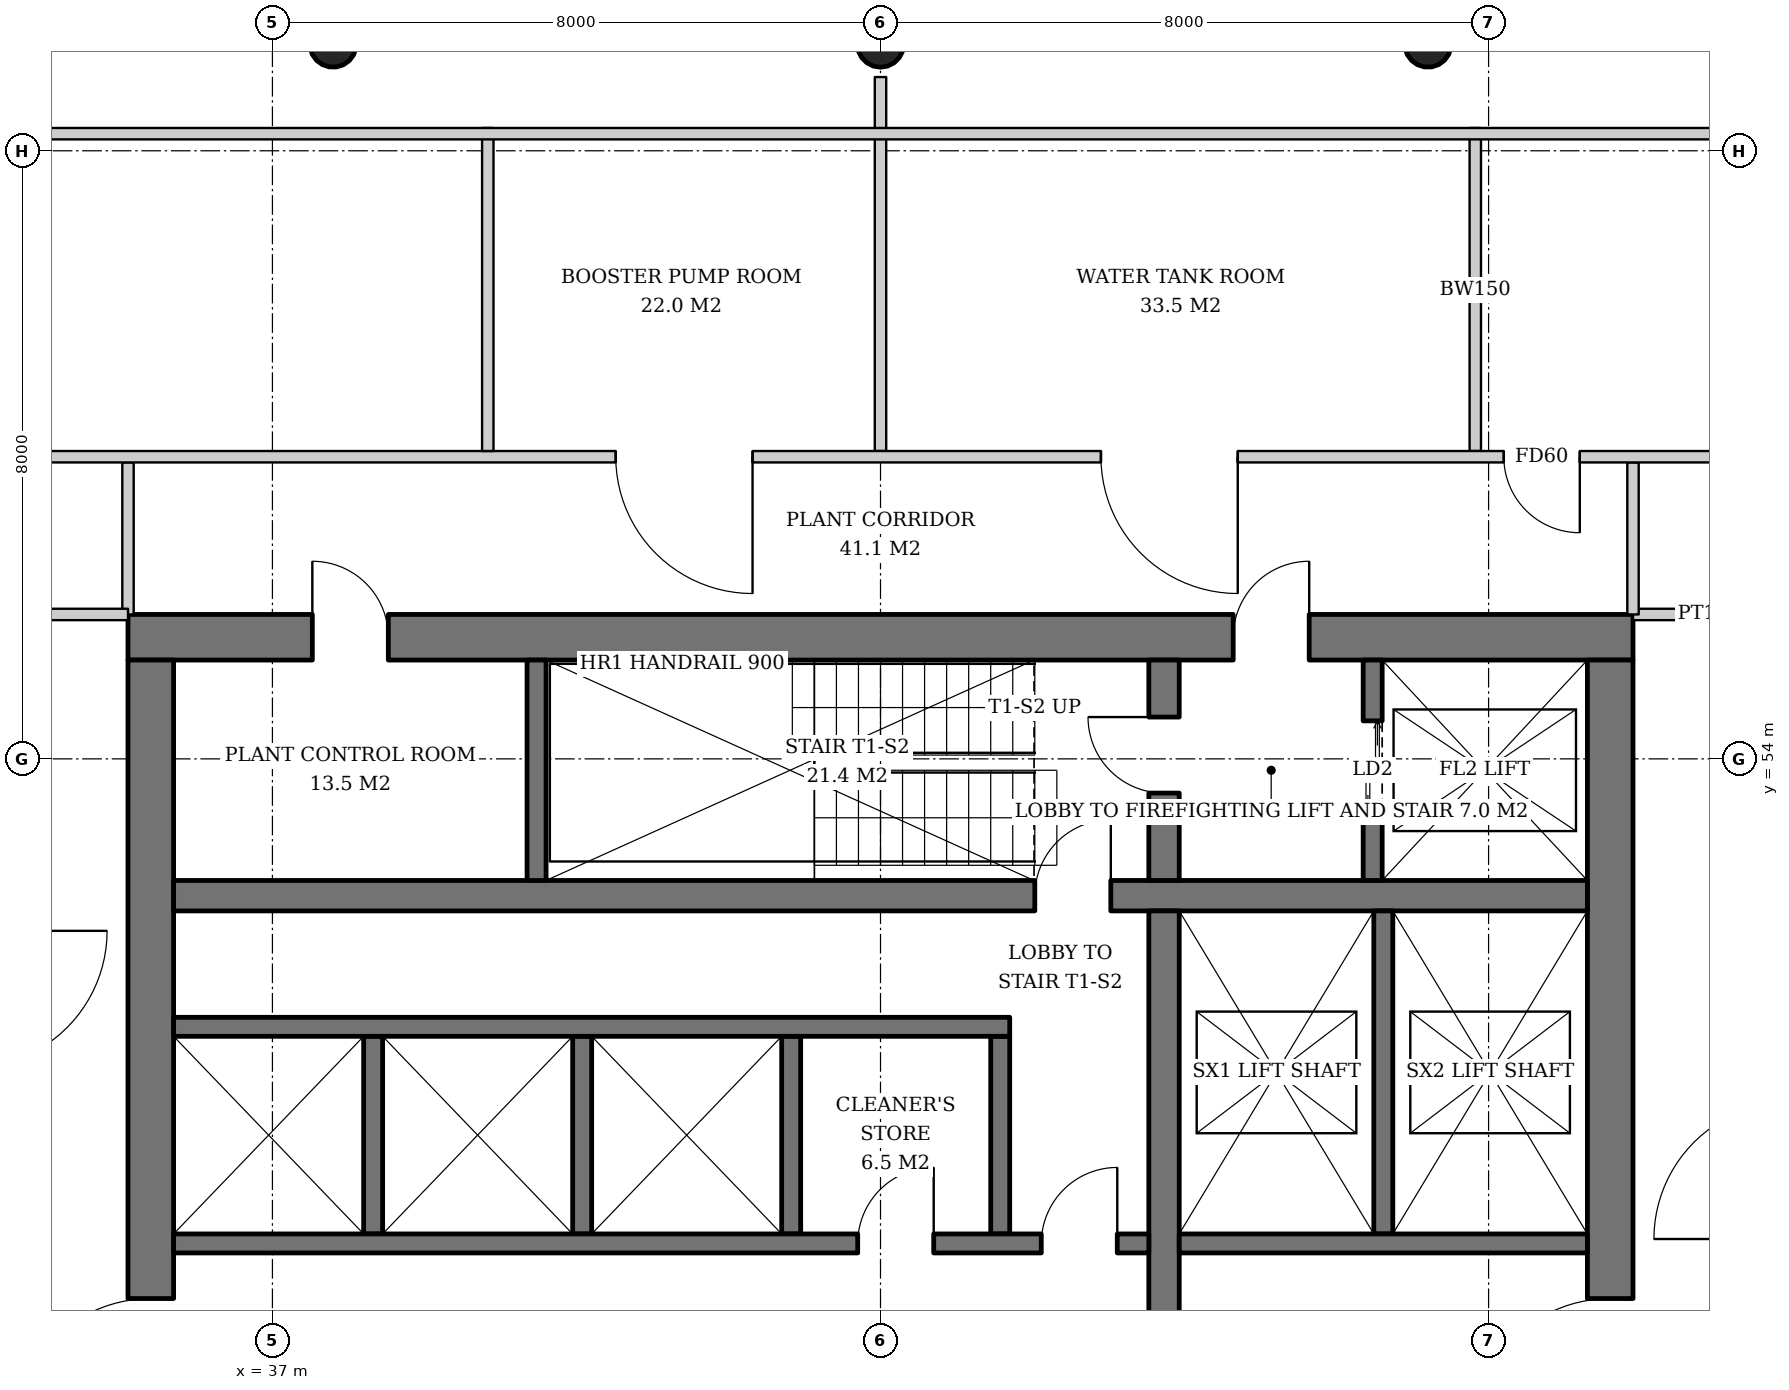
"""IFC4 building model, lengths in metres.
Left out: names, types, materials, properties, quantities, classifications, styles, units other than length and angle.
Written with IfcOpenShell. Run it as: python <this file> out.ifc"""

import sys

from ifc_helpers import new_model, si_unit, direction, frame, frame_2d, origin, origin_2d, place, context, subcontext, project, spatial, rectangle, hollow_circle, extrude, element, fill, save


model = new_model("IFC4")
c1 = context("Model", 3, precision=1e-05, world=origin(), true_north=direction((0.0, 1.0)))
c2 = subcontext(c1, "Body", "Model", "MODEL_VIEW")
j1 = project(units=[si_unit("LENGTHUNIT", "METRE"), si_unit("PLANEANGLEUNIT", "RADIAN")], contexts=[c1])
p1 = place(None, origin())
s1 = spatial("IfcSite", under=j1, at=p1, CompositionType="ELEMENT")
p2 = place(p1, origin())
s2 = spatial("IfcBuilding", under=s1, at=p2, CompositionType="ELEMENT")
p3 = place(p2, frame((0.0, 0.0, 226.2)))
s3 = spatial("IfcBuildingStorey", under=s2, at=p3, CompositionType="ELEMENT", Elevation=226.2)
p4 = place(p3, frame((52.221, 63.443, 0.0), z_axis=(-0.015987237665, -0.031910269556, 0.999362868496), x_axis=(0.894067115991, -0.447933021895, 0.0)))
e1 = element("IfcColumn", 1, at=p4, inside=s3, PredefinedType="COLUMN", context=c2, shape_type="SweptSolid", body=[
    extrude(hollow_circle(Radius=0.305, WallThickness=0.025, at=origin_2d()), origin(), (0.0, 0.0, 1.0), 3.802),
])
p5 = place(p3, frame((45.0, 63.443, 0.0), z_axis=(0.0, -0.031914348339, 0.999490607445), x_axis=(1.0, 0.0, 0.0)))
e2 = element("IfcColumn", 2, at=p5, inside=s3, PredefinedType="COLUMN", context=c2, shape_type="SweptSolid", body=[
    extrude(hollow_circle(Radius=0.305, WallThickness=0.025, at=origin_2d()), origin(), (0.0, 0.0, 1.0), 3.802),
])
p6 = place(p3, frame((37.779, 63.443, 0.0), z_axis=(0.015987237665, -0.031910269556, 0.999362868496), x_axis=(0.894067115991, 0.447933021895, 0.0)))
e3 = element("IfcColumn", 3, at=p6, inside=s3, PredefinedType="COLUMN", context=c2, shape_type="SweptSolid", body=[
    extrude(hollow_circle(Radius=0.305, WallThickness=0.025, at=origin_2d()), origin(), (0.0, 0.0, 1.0), 3.802),
])
p7 = place(p3, frame((35.1, 55.6, 0.0), z_axis=(0.0, 0.0, 1.0), x_axis=(1.0, 0.0, 0.0)))
e4 = element("IfcWall", 4, at=p7, inside=s3, PredefinedType="SHEAR", context=c2, shape_type="SweptSolid", body=[
    extrude(rectangle(XDim=19.8, YDim=0.6, at=frame_2d((9.9, 0.0))), origin(), (0.0, 0.0, 1.0), 3.8),
])
p8 = place(p7, frame((14.54, 0.0, 0.0)))
e5 = element("IfcOpeningElement", 5, at=p8, cuts=e4, PredefinedType="OPENING", context=c2, shape_type="SweptSolid", body=[
    extrude(rectangle(XDim=1.0, YDim=2.1, at=frame_2d((0.5, 1.05))), frame((0.0, 0.31, 0.0), z_axis=(0.0, -1.0, 0.0), x_axis=(1.0, 0.0, 0.0)), (0.0, 0.0, 1.0), 0.62),
])
p9 = place(p7, frame((2.425, 0.0, 0.0)))
e6 = element("IfcOpeningElement", 6, at=p9, cuts=e4, PredefinedType="OPENING", context=c2, shape_type="SweptSolid", body=[
    extrude(rectangle(XDim=1.0, YDim=2.1, at=frame_2d((0.5, 1.05))), frame((0.0, 0.31, 0.0), z_axis=(0.0, -1.0, 0.0), x_axis=(1.0, 0.0, 0.0)), (0.0, 0.0, 1.0), 0.62),
])
p10 = place(p3, frame((35.4, 36.7, 0.0), z_axis=(0.0, 0.0, 1.0), x_axis=(0.0, 1.0, 0.0)))
e7 = element("IfcWall", 7, at=p10, inside=s3, PredefinedType="SHEAR", context=c2, shape_type="SweptSolid", body=[
    extrude(rectangle(XDim=18.6, YDim=0.6, at=frame_2d((9.3, 0.0))), origin(), (0.0, 0.0, 1.0), 3.8),
])
p11 = place(p10, frame((8.4, 0.0, 0.0)))
e8 = element("IfcOpeningElement", 8, at=p11, cuts=e7, PredefinedType="OPENING", context=c2, shape_type="SweptSolid", body=[
    extrude(rectangle(XDim=1.8, YDim=2.4, at=frame_2d((0.9, 1.2))), frame((0.0, 0.31, 0.0), z_axis=(0.0, -1.0, 0.0), x_axis=(1.0, 0.0, 0.0)), (0.0, 0.0, 1.0), 0.62),
])
p12 = place(p3, frame((54.6, 36.7, 0.0), z_axis=(0.0, 0.0, 1.0), x_axis=(0.0, 1.0, 0.0)))
e9 = element("IfcWall", 9, at=p12, inside=s3, PredefinedType="SHEAR", context=c2, shape_type="SweptSolid", body=[
    extrude(rectangle(XDim=18.6, YDim=0.6, at=frame_2d((9.3, 0.0))), origin(), (0.0, 0.0, 1.0), 3.8),
])
p13 = place(p12, frame((8.4, 0.0, 0.0)))
e10 = element("IfcOpeningElement", 10, at=p13, cuts=e9, PredefinedType="OPENING", context=c2, shape_type="SweptSolid", body=[
    extrude(rectangle(XDim=1.8, YDim=2.4, at=frame_2d((0.9, 1.2))), frame((0.0, 0.31, 0.0), z_axis=(0.0, -1.0, 0.0), x_axis=(1.0, 0.0, 0.0)), (0.0, 0.0, 1.0), 0.62),
])
p14 = place(p3, frame((35.7, 52.2, 0.0), z_axis=(0.0, 0.0, 1.0), x_axis=(1.0, 0.0, 0.0)))
e11 = element("IfcWall", 11, at=p14, inside=s3, PredefinedType="SHEAR", context=c2, shape_type="SweptSolid", body=[
    extrude(rectangle(XDim=18.6, YDim=0.4, at=frame_2d((9.3, 0.0))), origin(), (0.0, 0.0, 1.0), 3.8),
])
p15 = place(p14, frame((11.33, 0.0, 0.0)))
e12 = element("IfcOpeningElement", 12, at=p15, cuts=e11, PredefinedType="OPENING", context=c2, shape_type="SweptSolid", body=[
    extrude(rectangle(XDim=1.0, YDim=2.1, at=frame_2d((0.5, 1.05))), frame((0.0, 0.21, 0.0), z_axis=(0.0, -1.0, 0.0), x_axis=(1.0, 0.0, 0.0)), (0.0, 0.0, 1.0), 0.42),
])
p16 = place(p3, frame((48.73, 40.0, 0.0), z_axis=(0.0, 0.0, 1.0), x_axis=(0.0, 1.0, 0.0)))
e13 = element("IfcWall", 13, at=p16, inside=s3, PredefinedType="SHEAR", context=c2, shape_type="SweptSolid", body=[
    extrude(rectangle(XDim=12.0, YDim=0.4, at=frame_2d((6.0, 0.0))), origin(), (0.0, 0.0, 1.0), 3.8),
])
p17 = place(p16, frame((5.5, 0.0, 0.0)))
e14 = element("IfcOpeningElement", 14, at=p17, cuts=e13, PredefinedType="OPENING", context=c2, shape_type="SweptSolid", body=[
    extrude(rectangle(XDim=1.0, YDim=2.1, at=frame_2d((0.5, 1.05))), frame((0.0, 0.21, 0.0), z_axis=(0.0, -1.0, 0.0), x_axis=(1.0, 0.0, 0.0)), (0.0, 0.0, 1.0), 0.42),
])
p18 = place(p3, frame((48.73, 52.4, 0.0), z_axis=(0.0, 0.0, 1.0), x_axis=(0.0, 1.0, 0.0)))
e15 = element("IfcWall", 15, at=p18, inside=s3, PredefinedType="SHEAR", context=c2, shape_type="SweptSolid", body=[
    extrude(rectangle(XDim=2.9, YDim=0.4, at=frame_2d((1.45, 0.0))), origin(), (0.0, 0.0, 1.0), 3.8),
])
p19 = place(p18, frame((1.15, 0.0, 0.0)))
e16 = element("IfcOpeningElement", 16, at=p19, cuts=e15, PredefinedType="OPENING", context=c2, shape_type="SweptSolid", body=[
    extrude(rectangle(XDim=1.0, YDim=2.1, at=frame_2d((0.5, 1.05))), frame((0.0, 0.21, 0.0), z_axis=(0.0, -1.0, 0.0), x_axis=(1.0, 0.0, 0.0)), (0.0, 0.0, 1.0), 0.42),
])
p20 = place(p3, frame((40.475, 52.4, 0.0), z_axis=(0.0, 0.0, 1.0), x_axis=(0.0, 1.0, 0.0)))
e17 = element("IfcWall", 17, at=p20, inside=s3, PredefinedType="SHEAR", context=c2, shape_type="SweptSolid", body=[
    extrude(rectangle(XDim=2.9, YDim=0.25, at=frame_2d((1.45, 0.0))), origin(), (0.0, 0.0, 1.0), 3.8),
])
p21 = place(p3, frame((51.475, 52.4, 0.0), z_axis=(0.0, 0.0, 1.0), x_axis=(0.0, 1.0, 0.0)))
e18 = element("IfcWall", 18, at=p21, inside=s3, PredefinedType="SHEAR", context=c2, shape_type="SweptSolid", body=[
    extrude(rectangle(XDim=2.9, YDim=0.25, at=frame_2d((1.45, 0.0))), origin(), (0.0, 0.0, 1.0), 3.8),
])
p22 = place(p21, frame((0.8, 0.0, 0.0)))
e19 = element("IfcOpeningElement", 19, at=p22, cuts=e18, PredefinedType="OPENING", context=c2, shape_type="SweptSolid", body=[
    extrude(rectangle(XDim=1.3, YDim=2.2, at=frame_2d((0.65, 1.1))), frame((0.0, 0.135, 0.0), z_axis=(0.0, -1.0, 0.0), x_axis=(1.0, 0.0, 0.0)), (0.0, 0.0, 1.0), 0.27),
])
for number, where, z_axis, x_axis in (
    (20, (38.325, 47.75, 0.0), (0.0, 0.0, 1.0), (0.0, 1.0, 0.0)),
    (21, (41.075, 47.75, 0.0), (0.0, 0.0, 1.0), (0.0, 1.0, 0.0)),
    (22, (43.825, 47.75, 0.0), (0.0, 0.0, 1.0), (0.0, 1.0, 0.0)),
    (23, (46.575, 47.75, 0.0), (0.0, 0.0, 1.0), (0.0, 1.0, 0.0)),
):
    element("IfcWall", number, at=place(p3, frame(where, z_axis=z_axis, x_axis=x_axis)), inside=s3, PredefinedType="SHEAR", context=c2, shape_type="SweptSolid", body=[
        extrude(rectangle(XDim=2.6, YDim=0.25, at=frame_2d((1.3, 0.0))), origin(), (0.0, 0.0, 1.0), 3.8),
    ])
p23 = place(p3, frame((35.7, 50.475, 0.0), z_axis=(0.0, 0.0, 1.0), x_axis=(1.0, 0.0, 0.0)))
e24 = element("IfcWall", 24, at=p23, inside=s3, PredefinedType="SHEAR", context=c2, shape_type="SweptSolid", body=[
    extrude(rectangle(XDim=11.0, YDim=0.25, at=frame_2d((5.5, 0.0))), origin(), (0.0, 0.0, 1.0), 3.8),
])
p24 = place(p3, frame((35.7, 47.625, 0.0), z_axis=(0.0, 0.0, 1.0), x_axis=(1.0, 0.0, 0.0)))
e25 = element("IfcWall", 25, at=p24, inside=s3, PredefinedType="SHEAR", context=c2, shape_type="SweptSolid", body=[
    extrude(rectangle(XDim=12.83, YDim=0.25, at=frame_2d((6.415, 0.0))), origin(), (0.0, 0.0, 1.0), 3.8),
])
p25 = place(p24, frame((9.0, 0.0, 0.0)))
e26 = element("IfcOpeningElement", 26, at=p25, cuts=e25, PredefinedType="OPENING", context=c2, shape_type="SweptSolid", body=[
    extrude(rectangle(XDim=1.0, YDim=2.1, at=frame_2d((0.5, 1.05))), frame((0.0, 0.135, 0.0), z_axis=(0.0, -1.0, 0.0), x_axis=(1.0, 0.0, 0.0)), (0.0, 0.0, 1.0), 0.27),
])
p26 = place(p24, frame((11.415, 0.0, 0.0)))
e27 = element("IfcOpeningElement", 27, at=p26, cuts=e25, PredefinedType="OPENING", context=c2, shape_type="SweptSolid", body=[
    extrude(rectangle(XDim=1.0, YDim=2.1, at=frame_2d((0.5, 1.05))), frame((0.0, 0.135, 0.0), z_axis=(0.0, -1.0, 0.0), x_axis=(1.0, 0.0, 0.0)), (0.0, 0.0, 1.0), 0.27),
])
p27 = place(p3, frame((51.615, 47.75, 0.0), z_axis=(0.0, 0.0, 1.0), x_axis=(0.0, 1.0, 0.0)))
e28 = element("IfcWall", 28, at=p27, inside=s3, PredefinedType="SHEAR", context=c2, shape_type="SweptSolid", body=[
    extrude(rectangle(XDim=4.25, YDim=0.25, at=frame_2d((2.125, 0.0))), origin(), (0.0, 0.0, 1.0), 3.8),
])
p28 = place(p3, frame((48.93, 47.625, 0.0), z_axis=(0.0, 0.0, 1.0), x_axis=(1.0, 0.0, 0.0)))
e29 = element("IfcWall", 29, at=p28, inside=s3, PredefinedType="SHEAR", context=c2, shape_type="SweptSolid", body=[
    extrude(rectangle(XDim=5.37, YDim=0.25, at=frame_2d((2.685, 0.0))), origin(), (0.0, 0.0, 1.0), 3.8),
])
for number, where, z_axis, x_axis in (
    (30, (54.9, 55.9, 0.0), (0.0, 0.0, 1.0), (1.0, 0.0, 0.0)),
    (31, (35.1, 55.9, 0.0), (0.0, 0.0, 1.0), (0.0, 1.0, 0.0)),
    (32, (54.9, 55.9, 0.0), (0.0, 0.0, 1.0), (0.0, 1.0, 0.0)),
):
    element("IfcWall", number, at=place(p3, frame(where, z_axis=z_axis, x_axis=x_axis)), inside=s3, PredefinedType="PARTITIONING", context=c2, shape_type="SweptSolid", body=[
        extrude(rectangle(XDim=2.0, YDim=0.15, at=frame_2d((1.0, 0.0))), origin(), (0.0, 0.0, 1.0), 3.52),
    ])
p29 = place(p3, frame((52.825, 58.05, 0.0), z_axis=(0.0, 0.0, 1.0), x_axis=(0.0, 1.0, 0.0)))
e33 = element("IfcWall", 33, at=p29, inside=s3, PredefinedType="SOLIDWALL", context=c2, shape_type="SweptSolid", body=[
    extrude(rectangle(XDim=4.25, YDim=0.15, at=frame_2d((2.125, 0.0))), origin(), (0.0, 0.0, 1.0), 3.52),
])
p30 = place(p3, frame((45.0, 58.05, 0.0), z_axis=(0.0, 0.0, 1.0), x_axis=(0.0, 1.0, 0.0)))
e34 = element("IfcWall", 34, at=p30, inside=s3, PredefinedType="SOLIDWALL", context=c2, shape_type="SweptSolid", body=[
    extrude(rectangle(XDim=4.92, YDim=0.15, at=frame_2d((2.46, 0.0))), origin(), (0.0, 0.0, 1.0), 3.52),
])
p31 = place(p3, frame((57.05, 57.975, 0.0), z_axis=(0.0, 0.0, 1.0), x_axis=(-1.0, 0.0, 0.0)))
e35 = element("IfcWall", 35, at=p31, inside=s3, PredefinedType="SOLIDWALL", context=c2, shape_type="SweptSolid", body=[
    extrude(rectangle(XDim=23.95, YDim=0.15, at=frame_2d((11.975, 0.0))), origin(), (0.0, 0.0, 1.0), 2.706),
])
p32 = place(p31, frame((2.85, 0.0, 0.0)))
e36 = element("IfcOpeningElement", 36, at=p32, cuts=e35, PredefinedType="OPENING", context=c2, shape_type="SweptSolid", body=[
    extrude(rectangle(XDim=1.0, YDim=2.1, at=frame_2d((0.5, 1.05))), frame((0.0, 0.085, 0.0), z_axis=(0.0, -1.0, 0.0), x_axis=(1.0, 0.0, 0.0)), (0.0, 0.0, 1.0), 0.17),
])
p33 = place(p31, frame((7.35, 0.0, 0.0)))
e37 = element("IfcOpeningElement", 37, at=p33, cuts=e35, PredefinedType="OPENING", context=c2, shape_type="SweptSolid", body=[
    extrude(rectangle(XDim=1.8, YDim=2.4, at=frame_2d((0.9, 1.2))), frame((0.0, 0.085, 0.0), z_axis=(0.0, -1.0, 0.0), x_axis=(1.0, 0.0, 0.0)), (0.0, 0.0, 1.0), 0.17),
])
p34 = place(p31, frame((13.733, 0.0, 0.0)))
e38 = element("IfcOpeningElement", 38, at=p34, cuts=e35, PredefinedType="OPENING", context=c2, shape_type="SweptSolid", body=[
    extrude(rectangle(XDim=1.8, YDim=2.4, at=frame_2d((0.9, 1.2))), frame((0.0, 0.085, 0.0), z_axis=(0.0, -1.0, 0.0), x_axis=(1.0, 0.0, 0.0)), (0.0, 0.0, 1.0), 0.17),
])
p35 = place(p3, frame((39.833, 58.05, 0.0), z_axis=(0.0, 0.0, 1.0), x_axis=(0.0, 1.0, 0.0)))
e39 = element("IfcWall", 39, at=p35, inside=s3, PredefinedType="SOLIDWALL", context=c2, shape_type="SweptSolid", body=[
    extrude(rectangle(XDim=4.25, YDim=0.15, at=frame_2d((2.125, 0.0))), origin(), (0.0, 0.0, 1.0), 3.52),
])
p36 = place(p3, frame((35.1, 55.9, 0.0), z_axis=(0.0, 0.0, 1.0), x_axis=(-1.0, 0.0, 0.0)))
e40 = element("IfcWall", 40, at=p36, inside=s3, PredefinedType="PARTITIONING", context=c2, shape_type="SweptSolid", body=[
    extrude(rectangle(XDim=2.0, YDim=0.15, at=frame_2d((1.0, 0.0))), origin(), (0.0, 0.0, 1.0), 3.52),
])
p37 = place(p3, frame((31.7, 62.225, 0.0), z_axis=(0.0, 0.0, 1.0), x_axis=(1.0, 0.0, 0.0)))
e41 = element("IfcWall", 41, at=p37, inside=s3, PredefinedType="PARTITIONING", context=c2, shape_type="SweptSolid", body=[
    extrude(rectangle(XDim=26.6, YDim=0.15, at=frame_2d((13.3, 0.0))), origin(), (0.0, 0.0, 1.0), 2.706),
])
p38 = place(p22, origin())
e42 = element("IfcDoor", 42, at=p38, inside=s3, OperationType="DOUBLE_DOOR_SLIDING", PredefinedType="DOOR", context=c2, shape_type="SweptSolid", body=[
    extrude(rectangle(XDim=1.3, YDim=2.2, at=frame_2d((0.65, 1.1))), frame((0.0, 0.025, 0.0), z_axis=(0.0, -1.0, 0.0), x_axis=(1.0, 0.0, 0.0)), (0.0, 0.0, 1.0), 0.05),
])
fill(e19, e42)
p39 = place(p25, origin())
e43 = element("IfcDoor", 43, at=p39, inside=s3, OperationType="SINGLE_SWING_RIGHT", PredefinedType="DOOR", context=c2, shape_type="SweptSolid", body=[
    extrude(rectangle(XDim=1.0, YDim=2.1, at=frame_2d((0.5, 1.05))), frame((0.0, 0.025, 0.0), z_axis=(0.0, -1.0, 0.0), x_axis=(1.0, 0.0, 0.0)), (0.0, 0.0, 1.0), 0.05),
])
fill(e26, e43)
p40 = place(p26, origin())
e44 = element("IfcDoor", 44, at=p40, inside=s3, OperationType="SINGLE_SWING_RIGHT", PredefinedType="DOOR", context=c2, shape_type="SweptSolid", body=[
    extrude(rectangle(XDim=1.0, YDim=2.1, at=frame_2d((0.5, 1.05))), frame((0.0, 0.025, 0.0), z_axis=(0.0, -1.0, 0.0), x_axis=(1.0, 0.0, 0.0)), (0.0, 0.0, 1.0), 0.05),
])
fill(e27, e44)
p41 = place(p19, origin())
e45 = element("IfcDoor", 45, at=p41, inside=s3, OperationType="SINGLE_SWING_RIGHT", PredefinedType="DOOR", context=c2, shape_type="SweptSolid", body=[
    extrude(rectangle(XDim=1.0, YDim=2.1, at=frame_2d((0.5, 1.05))), frame((0.0, 0.025, 0.0), z_axis=(0.0, -1.0, 0.0), x_axis=(1.0, 0.0, 0.0)), (0.0, 0.0, 1.0), 0.05),
])
fill(e16, e45)
p42 = place(p8, origin())
e46 = element("IfcDoor", 46, at=p42, inside=s3, OperationType="SINGLE_SWING_RIGHT", PredefinedType="DOOR", context=c2, shape_type="SweptSolid", body=[
    extrude(rectangle(XDim=1.0, YDim=2.1, at=frame_2d((0.5, 1.05))), frame((0.0, 0.025, 0.0), z_axis=(0.0, -1.0, 0.0), x_axis=(1.0, 0.0, 0.0)), (0.0, 0.0, 1.0), 0.05),
])
fill(e5, e46)
p43 = place(p11, origin())
e47 = element("IfcDoor", 47, at=p43, inside=s3, OperationType="DOUBLE_DOOR_SINGLE_SWING", PredefinedType="DOOR", context=c2, shape_type="SweptSolid", body=[
    extrude(rectangle(XDim=1.8, YDim=2.4, at=frame_2d((0.9, 1.2))), frame((0.0, 0.025, 0.0), z_axis=(0.0, -1.0, 0.0), x_axis=(1.0, 0.0, 0.0)), (0.0, 0.0, 1.0), 0.05),
])
fill(e8, e47)
p44 = place(p13, origin())
e48 = element("IfcDoor", 48, at=p44, inside=s3, OperationType="DOUBLE_DOOR_SINGLE_SWING", PredefinedType="DOOR", context=c2, shape_type="SweptSolid", body=[
    extrude(rectangle(XDim=1.8, YDim=2.4, at=frame_2d((0.9, 1.2))), frame((0.0, 0.025, 0.0), z_axis=(0.0, -1.0, 0.0), x_axis=(1.0, 0.0, 0.0)), (0.0, 0.0, 1.0), 0.05),
])
fill(e10, e48)
p45 = place(p15, origin())
e49 = element("IfcDoor", 49, at=p45, inside=s3, OperationType="SINGLE_SWING_RIGHT", PredefinedType="DOOR", context=c2, shape_type="SweptSolid", body=[
    extrude(rectangle(XDim=1.0, YDim=2.1, at=frame_2d((0.5, 1.05))), frame((0.0, 0.025, 0.0), z_axis=(0.0, -1.0, 0.0), x_axis=(1.0, 0.0, 0.0)), (0.0, 0.0, 1.0), 0.05),
])
fill(e12, e49)
p46 = place(p9, origin())
e50 = element("IfcDoor", 50, at=p46, inside=s3, OperationType="SINGLE_SWING_LEFT", PredefinedType="DOOR", context=c2, shape_type="SweptSolid", body=[
    extrude(rectangle(XDim=1.0, YDim=2.1, at=frame_2d((0.5, 1.05))), frame((0.0, -0.24, 0.0), z_axis=(0.0, -1.0, 0.0), x_axis=(1.0, 0.0, 0.0)), (0.0, 0.0, 1.0), 0.05),
])
fill(e6, e50)
p47 = place(p32, origin())
e51 = element("IfcDoor", 51, at=p47, inside=s3, OperationType="SINGLE_SWING_LEFT", PredefinedType="DOOR", context=c2, shape_type="SweptSolid", body=[
    extrude(rectangle(XDim=1.0, YDim=2.1, at=frame_2d((0.5, 1.05))), frame((0.0, 0.025, 0.0), z_axis=(0.0, -1.0, 0.0), x_axis=(1.0, 0.0, 0.0)), (0.0, 0.0, 1.0), 0.05),
])
fill(e36, e51)
p48 = place(p33, origin())
e52 = element("IfcDoor", 52, at=p48, inside=s3, OperationType="DOUBLE_DOOR_SINGLE_SWING", PredefinedType="DOOR", context=c2, shape_type="SweptSolid", body=[
    extrude(rectangle(XDim=1.8, YDim=2.4, at=frame_2d((0.9, 1.2))), frame((0.0, 0.025, 0.0), z_axis=(0.0, -1.0, 0.0), x_axis=(1.0, 0.0, 0.0)), (0.0, 0.0, 1.0), 0.05),
])
fill(e37, e52)
p49 = place(p34, origin())
e53 = element("IfcDoor", 53, at=p49, inside=s3, OperationType="DOUBLE_DOOR_SINGLE_SWING", PredefinedType="DOOR", context=c2, shape_type="SweptSolid", body=[
    extrude(rectangle(XDim=1.8, YDim=2.4, at=frame_2d((0.9, 1.2))), frame((0.0, 0.025, 0.0), z_axis=(0.0, -1.0, 0.0), x_axis=(1.0, 0.0, 0.0)), (0.0, 0.0, 1.0), 0.05),
])
fill(e38, e53)
save(model, sys.argv[1])
